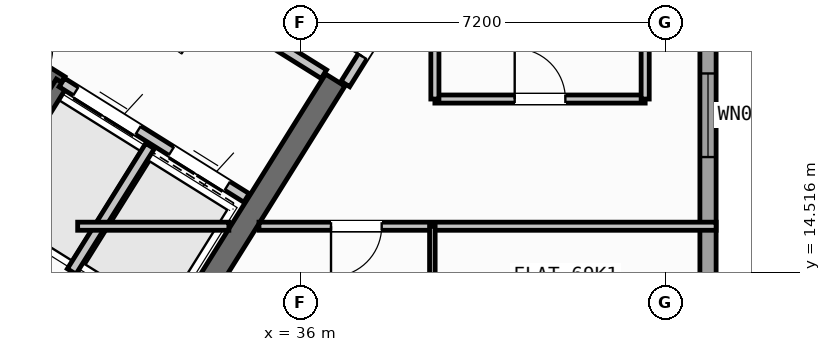
"""IFC4 building model, lengths in metres.
Left out: names, types, materials, properties, quantities, classifications, styles, units other than length and angle.
Written with IfcOpenShell. Run it as: python <this file> out.ifc"""

import sys

from ifc_helpers import new_model, si_unit, direction, frame, frame_2d, origin, place, context, subcontext, project, spatial, rectangle, extrude, source, transform, mapped, element, fill, save


model = new_model("IFC4")
c1 = context("Model", 3, precision=1e-05, world=origin(), true_north=direction((0.0, 1.0)))
c2 = subcontext(c1, "Body", "Model", "MODEL_VIEW")
j1 = project(units=[si_unit("LENGTHUNIT", "METRE"), si_unit("PLANEANGLEUNIT", "RADIAN")], contexts=[c1])
p1 = place(None, origin())
s1 = spatial("IfcSite", under=j1, at=p1, CompositionType="ELEMENT")
p2 = place(p1, origin())
s2 = spatial("IfcBuilding", under=s1, at=p2, CompositionType="ELEMENT")
p3 = place(p2, frame((0.0, 0.0, 273.6)))
s3 = spatial("IfcBuildingStorey", under=s2, at=p3, CompositionType="ELEMENT", Elevation=273.6)
p4 = place(p3, frame((33.324, 12.503, 0.0), z_axis=(0.0, 0.0, 1.0), x_axis=(-0.848043529849, 0.529926571782, 0.0)))
e1 = element("IfcWall", 1, at=p4, inside=s3, PredefinedType="SHEAR", context=c2, shape_type="SweptSolid", body=[
    extrude(rectangle(XDim=13.04, YDim=0.45, at=frame_2d((6.52, 0.0))), origin(), (0.0, 0.0, 1.0), 3.35),
])
p5 = place(p3, frame((36.683, 18.304, 0.0), z_axis=(0.0, 0.0, 1.0), x_axis=(-0.529904039071, -0.848057609704, 0.0)))
e2 = element("IfcWall", 2, at=p5, inside=s3, PredefinedType="SHEAR", context=c2, shape_type="SweptSolid", body=[
    extrude(rectangle(XDim=6.475, YDim=0.45, at=frame_2d((3.238, 0.0))), origin(), (0.0, 0.0, 1.0), 3.35),
])
p6 = place(p3, frame((44.04, 23.04, 0.0), z_axis=(0.0, 0.0, 1.0), x_axis=(0.0, -1.0, 0.0)))
e3 = element("IfcWall", 3, at=p6, inside=s3, PredefinedType="STANDARD", context=c2, shape_type="SweptSolid", body=[
    extrude(rectangle(XDim=21.08, YDim=0.32, at=frame_2d((10.54, 0.0))), origin(), (0.0, 0.0, 1.0), 3.35),
])
p7 = place(p6, frame((1.285, 0.0, 0.9)))
e4 = element("IfcOpeningElement", 4, at=p7, cuts=e3, PredefinedType="OPENING", context=c2, shape_type="SweptSolid", body=[
    extrude(rectangle(XDim=1.65, YDim=1.45, at=frame_2d((0.825, 0.725))), frame((0.0, 0.17, 0.0), z_axis=(0.0, -1.0, 0.0), x_axis=(1.0, 0.0, 0.0)), (0.0, 0.0, 1.0), 0.34),
])
p8 = place(p6, frame((4.605, 0.0, 0.9)))
e5 = element("IfcOpeningElement", 5, at=p8, cuts=e3, PredefinedType="OPENING", context=c2, shape_type="SweptSolid", body=[
    extrude(rectangle(XDim=1.65, YDim=1.45, at=frame_2d((0.825, 0.725))), frame((0.0, 0.17, 0.0), z_axis=(0.0, -1.0, 0.0), x_axis=(1.0, 0.0, 0.0)), (0.0, 0.0, 1.0), 0.34),
])
p9 = place(p6, frame((8.8, 0.0, 1.0)))
e6 = element("IfcOpeningElement", 6, at=p9, cuts=e3, PredefinedType="OPENING", context=c2, shape_type="SweptSolid", body=[
    extrude(rectangle(XDim=0.9, YDim=1.25, at=frame_2d((0.45, 0.625))), frame((0.0, 0.17, 0.0), z_axis=(0.0, -1.0, 0.0), x_axis=(1.0, 0.0, 0.0)), (0.0, 0.0, 1.0), 0.34),
])
p10 = place(p6, frame((12.189, 0.0, 1.0)))
e7 = element("IfcOpeningElement", 7, at=p10, cuts=e3, PredefinedType="OPENING", context=c2, shape_type="SweptSolid", body=[
    extrude(rectangle(XDim=0.9, YDim=1.25, at=frame_2d((0.45, 0.625))), frame((0.0, 0.17, 0.0), z_axis=(0.0, -1.0, 0.0), x_axis=(1.0, 0.0, 0.0)), (0.0, 0.0, 1.0), 0.34),
])
p11 = place(p6, frame((14.686, 0.0, 1.0)))
e8 = element("IfcOpeningElement", 8, at=p11, cuts=e3, PredefinedType="OPENING", context=c2, shape_type="SweptSolid", body=[
    extrude(rectangle(XDim=0.9, YDim=1.25, at=frame_2d((0.45, 0.625))), frame((0.0, 0.17, 0.0), z_axis=(0.0, -1.0, 0.0), x_axis=(1.0, 0.0, 0.0)), (0.0, 0.0, 1.0), 0.34),
])
p12 = place(p6, frame((18.337, 0.0, 0.9)))
e9 = element("IfcOpeningElement", 9, at=p12, cuts=e3, PredefinedType="OPENING", context=c2, shape_type="SweptSolid", body=[
    extrude(rectangle(XDim=1.35, YDim=1.45, at=frame_2d((0.675, 0.725))), frame((0.0, 0.17, 0.0), z_axis=(0.0, -1.0, 0.0), x_axis=(1.0, 0.0, 0.0)), (0.0, 0.0, 1.0), 0.34),
])
p13 = place(p3, frame((31.28, 18.261, 0.0), z_axis=(0.0, 0.0, 1.0), x_axis=(-0.848051618787, 0.529913626805, 0.0)))
e10 = element("IfcWall", 10, at=p13, inside=s3, PredefinedType="SHEAR", context=c2, shape_type="SweptSolid", body=[
    extrude(rectangle(XDim=7.46, YDim=0.26, at=frame_2d((3.73, 0.0))), origin(), (0.0, 0.0, 1.0), 3.35),
])
p14 = place(p13, frame((0.36, 0.0, 0.0)))
e11 = element("IfcOpeningElement", 11, at=p14, cuts=e10, PredefinedType="OPENING", context=c2, shape_type="SweptSolid", body=[
    extrude(rectangle(XDim=0.86, YDim=2.05, at=frame_2d((0.43, 1.025))), frame((0.0, 0.14, 0.0), z_axis=(0.0, -1.0, 0.0), x_axis=(1.0, 0.0, 0.0)), (0.0, 0.0, 1.0), 0.28),
])
p15 = place(p3, frame((31.288, 18.256, 0.0), z_axis=(0.0, 0.0, 1.0), x_axis=(-0.529943379326, -0.848033026897, 0.0)))
e12 = element("IfcWall", 12, at=p15, inside=s3, PredefinedType="SHEAR", context=c2, shape_type="SweptSolid", body=[
    extrude(rectangle(XDim=3.16, YDim=0.26, at=frame_2d((1.58, 0.0))), origin(), (0.0, 0.0, 1.0), 3.35),
])
p16 = place(p3, frame((34.933, 15.978, 0.0), z_axis=(0.0, 0.0, 1.0), x_axis=(-0.848055739377, 0.529907032327, 0.0)))
e13 = element("IfcWall", 13, at=p16, inside=s3, PredefinedType="STANDARD", context=c2, shape_type="SweptSolid", body=[
    extrude(rectangle(XDim=4.298, YDim=0.2, at=frame_2d((2.149, 0.0))), origin(), (0.0, 0.0, 1.0), 3.34),
])
p17 = place(p16, frame((0.448, 0.0, 0.0)))
e14 = element("IfcOpeningElement", 14, at=p17, cuts=e13, PredefinedType="OPENING", context=c2, shape_type="SweptSolid", body=[
    extrude(rectangle(XDim=1.3, YDim=2.2, at=frame_2d((0.65, 1.1))), frame((0.0, 0.11, 0.0), z_axis=(0.0, -1.0, 0.0), x_axis=(1.0, 0.0, 0.0)), (0.0, 0.0, 1.0), 0.22),
])
p18 = place(p16, frame((2.523, 0.0, 0.0)))
e15 = element("IfcOpeningElement", 15, at=p18, cuts=e13, PredefinedType="OPENING", context=c2, shape_type="SweptSolid", body=[
    extrude(rectangle(XDim=1.45, YDim=2.25, at=frame_2d((0.725, 1.125))), frame((0.0, 0.11, 0.0), z_axis=(0.0, -1.0, 0.0), x_axis=(1.0, 0.0, 0.0)), (0.0, 0.0, 1.0), 0.22),
])
p19 = place(p3, frame((36.459, 18.421, 0.0), z_axis=(0.0, 0.0, 1.0), x_axis=(-0.848059591691, 0.529900867089, 0.0)))
e16 = element("IfcWall", 16, at=p19, inside=s3, PredefinedType="STANDARD", context=c2, shape_type="SweptSolid", body=[
    extrude(rectangle(XDim=5.818, YDim=0.2, at=frame_2d((2.909, 0.0))), origin(), (0.0, 0.0, 1.0), 3.34),
])
p20 = place(p19, frame((2.598, 0.0, 0.0)))
e17 = element("IfcOpeningElement", 17, at=p20, cuts=e16, PredefinedType="OPENING", context=c2, shape_type="SweptSolid", body=[
    extrude(rectangle(XDim=1.15, YDim=2.1, at=frame_2d((0.575, 1.05))), frame((0.0, 0.11, 0.0), z_axis=(0.0, -1.0, 0.0), x_axis=(1.0, 0.0, 0.0)), (0.0, 0.0, 1.0), 0.22),
])
p21 = place(p3, frame((33.029, 17.003, 0.0), z_axis=(0.0, 0.0, 1.0), x_axis=(-0.529916267533, -0.848049968695, 0.0)))
e18 = element("IfcWall", 18, at=p21, inside=s3, PredefinedType="STANDARD", context=c2, shape_type="SweptSolid", body=[
    extrude(rectangle(XDim=2.92, YDim=0.2, at=frame_2d((1.46, 0.0))), origin(), (0.0, 0.0, 1.0), 3.34),
])
p22 = place(p3, frame((32.164, 10.374, 0.0), z_axis=(0.0, 0.0, 1.0), x_axis=(-0.848044107957, 0.529925646633, 0.0)))
e19 = element("IfcWall", 19, at=p22, inside=s3, PredefinedType="PARTITIONING", context=c2, shape_type="SweptSolid", body=[
    extrude(rectangle(XDim=15.57, YDim=0.16, at=frame_2d((7.785, 0.0))), origin(), (0.0, 0.0, 1.0), 3.34),
])
p23 = place(p22, frame((10.83, 0.0, 0.0)))
e20 = element("IfcOpeningElement", 20, at=p23, cuts=e19, PredefinedType="OPENING", context=c2, shape_type="SweptSolid", body=[
    extrude(rectangle(XDim=1.0, YDim=2.1, at=frame_2d((0.5, 1.05))), frame((0.0, 0.09, 0.0), z_axis=(0.0, -1.0, 0.0), x_axis=(1.0, 0.0, 0.0)), (0.0, 0.0, 1.0), 0.18),
])
p24 = place(p3, frame((38.451, 20.737, 0.0), z_axis=(0.0, 0.0, 1.0), x_axis=(-0.529924799939, -0.848044637038, 0.0)))
e21 = element("IfcWall", 21, at=p24, inside=s3, PredefinedType="STANDARD", context=c2, shape_type="SweptSolid", body=[
    extrude(rectangle(XDim=2.96, YDim=0.2, at=frame_2d((1.48, 0.0))), origin(), (0.0, 0.0, 1.0), 3.34),
])
p25 = place(p24, frame((1.46, 0.0, 0.0)))
e22 = element("IfcOpeningElement", 22, at=p25, cuts=e21, PredefinedType="OPENING", context=c2, shape_type="SweptSolid", body=[
    extrude(rectangle(XDim=0.86, YDim=2.05, at=frame_2d((0.43, 1.025))), frame((0.0, 0.11, 0.0), z_axis=(0.0, -1.0, 0.0), x_axis=(1.0, 0.0, 0.0)), (0.0, 0.0, 1.0), 0.22),
])
p26 = place(p3, frame((31.6, 15.42, 0.0), z_axis=(0.0, 0.0, 1.0), x_axis=(1.0, 0.0, 0.0)))
e23 = element("IfcWall", 23, at=p26, inside=s3, PredefinedType="PARTITIONING", context=c2, shape_type="SweptSolid", body=[
    extrude(rectangle(XDim=2.984, YDim=0.16, at=frame_2d((1.492, 0.0))), origin(), (0.0, 0.0, 1.0), 3.34),
])
p27 = place(p3, frame((35.178, 15.42, 0.0), z_axis=(0.0, 0.0, 1.0), x_axis=(1.0, 0.0, 0.0)))
e24 = element("IfcWall", 24, at=p27, inside=s3, PredefinedType="PARTITIONING", context=c2, shape_type="SweptSolid", body=[
    extrude(rectangle(XDim=9.021, YDim=0.16, at=frame_2d((4.511, 0.0))), origin(), (0.0, 0.0, 1.0), 3.34),
])
p28 = place(p27, frame((1.422, 0.0, 0.0)))
e25 = element("IfcOpeningElement", 25, at=p28, cuts=e24, PredefinedType="OPENING", context=c2, shape_type="SweptSolid", body=[
    extrude(rectangle(XDim=1.0, YDim=2.1, at=frame_2d((0.5, 1.05))), frame((0.0, 0.09, 0.0), z_axis=(0.0, -1.0, 0.0), x_axis=(1.0, 0.0, 0.0)), (0.0, 0.0, 1.0), 0.18),
])
p29 = place(p3, frame((38.65, 17.93, 0.0), z_axis=(0.0, 0.0, 1.0), x_axis=(1.0, 0.0, 0.0)))
e26 = element("IfcWall", 26, at=p29, inside=s3, PredefinedType="PARTITIONING", context=c2, shape_type="SweptSolid", body=[
    extrude(rectangle(XDim=4.15, YDim=0.16, at=frame_2d((2.075, 0.0))), origin(), (0.0, 0.0, 1.0), 3.34),
])
p30 = place(p29, frame((1.575, 0.0, 0.0)))
e27 = element("IfcOpeningElement", 27, at=p30, cuts=e26, PredefinedType="OPENING", context=c2, shape_type="SweptSolid", body=[
    extrude(rectangle(XDim=1.0, YDim=2.1, at=frame_2d((0.5, 1.05))), frame((0.0, 0.09, 0.0), z_axis=(0.0, -1.0, 0.0), x_axis=(1.0, 0.0, 0.0)), (0.0, 0.0, 1.0), 0.18),
])
p31 = place(p3, frame((38.65, 17.93, 0.0), z_axis=(0.0, 0.0, 1.0), x_axis=(0.0, 1.0, 0.0)))
e28 = element("IfcWall", 28, at=p31, inside=s3, PredefinedType="PARTITIONING", context=c2, shape_type="SweptSolid", body=[
    extrude(rectangle(XDim=3.046, YDim=0.16, at=frame_2d((1.523, 0.0))), origin(), (0.0, 0.0, 1.0), 3.34),
])
p32 = place(p3, frame((42.8, 17.93, 0.0), z_axis=(0.0, 0.0, 1.0), x_axis=(0.0, 1.0, 0.0)))
e29 = element("IfcWall", 29, at=p32, inside=s3, PredefinedType="PARTITIONING", context=c2, shape_type="SweptSolid", body=[
    extrude(rectangle(XDim=3.57, YDim=0.16, at=frame_2d((1.785, 0.0))), origin(), (0.0, 0.0, 1.0), 3.34),
])
p33 = place(p3, frame((38.6, 1.96, 0.0), z_axis=(0.0, 0.0, 1.0), x_axis=(0.0, 1.0, 0.0)))
e30 = element("IfcWall", 30, at=p33, inside=s3, PredefinedType="PARTITIONING", context=c2, shape_type="SweptSolid", body=[
    extrude(rectangle(XDim=13.46, YDim=0.11, at=frame_2d((6.73, 0.0))), origin(), (0.0, 0.0, 1.0), 3.34),
])
p34 = place(p33, frame((5.2, 0.0, 0.0)))
e31 = element("IfcOpeningElement", 31, at=p34, cuts=e30, PredefinedType="OPENING", context=c2, shape_type="SweptSolid", body=[
    extrude(rectangle(XDim=0.92, YDim=2.08, at=frame_2d((0.46, 1.04))), frame((0.0, 0.065, 0.0), z_axis=(0.0, -1.0, 0.0), x_axis=(1.0, 0.0, 0.0)), (0.0, 0.0, 1.0), 0.13),
])
p35 = place(p33, frame((10.67, 0.0, 0.0)))
e32 = element("IfcOpeningElement", 32, at=p35, cuts=e30, PredefinedType="OPENING", context=c2, shape_type="SweptSolid", body=[
    extrude(rectangle(XDim=0.88, YDim=2.08, at=frame_2d((0.44, 1.04))), frame((0.0, 0.065, 0.0), z_axis=(0.0, -1.0, 0.0), x_axis=(1.0, 0.0, 0.0)), (0.0, 0.0, 1.0), 0.13),
])
m1 = source(origin(), c2, "Body", "SweptSolid", [
    extrude(rectangle(XDim=1.65, YDim=1.45, at=frame_2d((0.825, 0.725))), frame((0.0, 0.03, 0.0), z_axis=(0.0, -1.0, 0.0), x_axis=(1.0, 0.0, 0.0)), (0.0, 0.0, 1.0), 0.06),
])
p36 = place(p8, origin())
e33 = element("IfcWindow", 33, at=p36, inside=s3, PartitioningType="SINGLE_PANEL", PredefinedType="WINDOW", context=c2, shape_type="MappedRepresentation", body=[
    mapped(m1, transform((0.0, 0.0, 0.0), scale=1.0)),
])
fill(e5, e33)
m2 = source(origin(), c2, "Body", "SweptSolid", [
    extrude(rectangle(XDim=1.3, YDim=2.2, at=frame_2d((0.65, 1.1))), frame((0.0, 0.025, 0.0), z_axis=(0.0, -1.0, 0.0), x_axis=(1.0, 0.0, 0.0)), (0.0, 0.0, 1.0), 0.05),
])
p37 = place(p17, origin())
e34 = element("IfcDoor", 34, at=p37, inside=s3, OperationType="DOUBLE_DOOR_SLIDING", PredefinedType="DOOR", context=c2, shape_type="MappedRepresentation", body=[
    mapped(m2, transform((0.0, 0.0, 0.0), scale=1.0)),
])
fill(e14, e34)
m3 = source(origin(), c2, "Body", "SweptSolid", [
    extrude(rectangle(XDim=1.45, YDim=2.25, at=frame_2d((0.725, 1.125))), frame((0.0, 0.025, 0.0), z_axis=(0.0, -1.0, 0.0), x_axis=(1.0, 0.0, 0.0)), (0.0, 0.0, 1.0), 0.05),
])
p38 = place(p18, origin())
e35 = element("IfcDoor", 35, at=p38, inside=s3, OperationType="DOUBLE_DOOR_SLIDING", PredefinedType="DOOR", context=c2, shape_type="MappedRepresentation", body=[
    mapped(m3, transform((0.0, 0.0, 0.0), scale=1.0)),
])
fill(e15, e35)
m4 = source(origin(), c2, "Body", "SweptSolid", [
    extrude(rectangle(XDim=1.0, YDim=2.1, at=frame_2d((0.5, 1.05))), frame((0.0, 0.025, 0.0), z_axis=(0.0, -1.0, 0.0), x_axis=(1.0, 0.0, 0.0)), (0.0, 0.0, 1.0), 0.05),
])
p39 = place(p30, origin())
e36 = element("IfcDoor", 36, at=p39, inside=s3, OperationType="SINGLE_SWING_LEFT", PredefinedType="DOOR", context=c2, shape_type="MappedRepresentation", body=[
    mapped(m4, transform((0.0, 0.0, 0.0), scale=1.0)),
])
fill(e27, e36)
m5 = source(origin(), c2, "Body", "SweptSolid", [
    extrude(rectangle(XDim=0.86, YDim=2.05, at=frame_2d((0.43, 1.025))), frame((0.0, 0.025, 0.0), z_axis=(0.0, -1.0, 0.0), x_axis=(1.0, 0.0, 0.0)), (0.0, 0.0, 1.0), 0.05),
])
p40 = place(p25, frame((0.86, 0.0, 0.0), z_axis=(0.0, 0.0, 1.0), x_axis=(-1.0, 0.0, 0.0)))
e37 = element("IfcDoor", 37, at=p40, inside=s3, OperationType="SINGLE_SWING_LEFT", PredefinedType="DOOR", context=c2, shape_type="MappedRepresentation", body=[
    mapped(m5, transform((0.0, 0.0, 0.0), scale=1.0)),
])
fill(e22, e37)
p41 = place(p28, frame((1.0, 0.0, 0.0), z_axis=(0.0, 0.0, 1.0), x_axis=(-1.0, 0.0, 0.0)))
e38 = element("IfcDoor", 38, at=p41, inside=s3, OperationType="SINGLE_SWING_RIGHT", PredefinedType="DOOR", context=c2, shape_type="MappedRepresentation", body=[
    mapped(m4, transform((0.0, 0.0, 0.0), scale=1.0)),
])
fill(e25, e38)
save(model, sys.argv[1])
